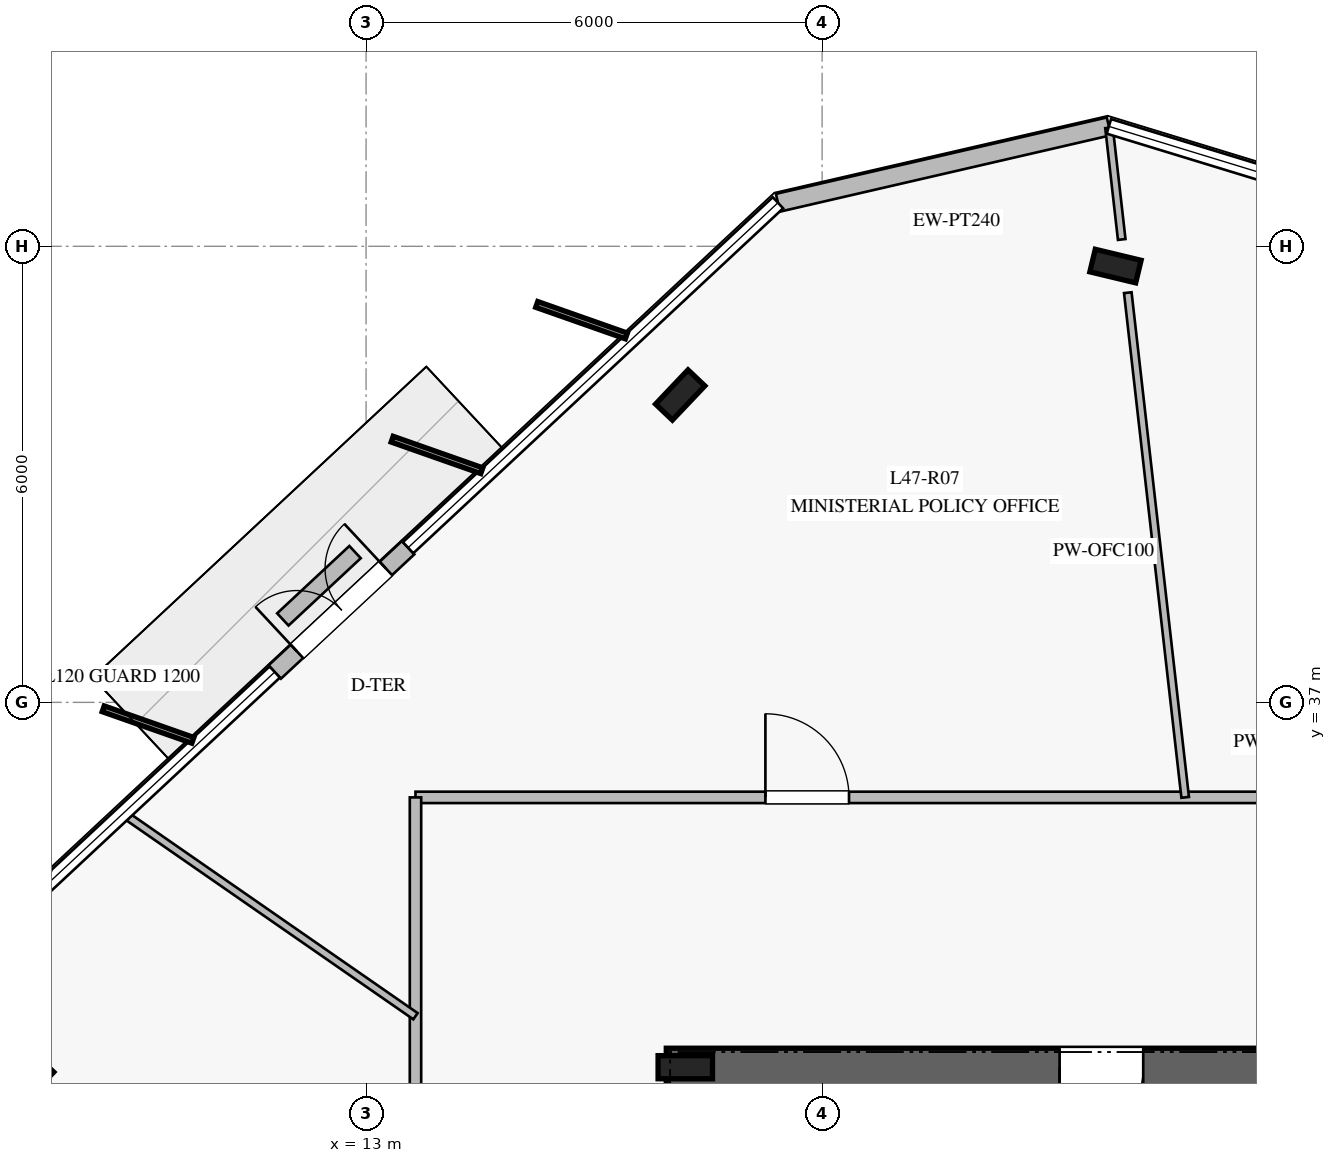
"""IFC4 building model, lengths in metres.
Left out: names, types, materials, properties, quantities, classifications, styles, units other than length and angle.
Written with IfcOpenShell. Run it as: python <this file> out.ifc"""

import sys

from ifc_helpers import new_model, si_unit, direction, frame, frame_2d, origin, origin_2d, place, context, subcontext, project, spatial, rectangle, i_section, extrude, element, fill, save


model = new_model("IFC4")
c1 = context("Model", 3, precision=1e-05, world=origin(), true_north=direction((0.0, 1.0)))
c2 = subcontext(c1, "Body", "Model", "MODEL_VIEW")
j1 = project(units=[si_unit("LENGTHUNIT", "METRE"), si_unit("PLANEANGLEUNIT", "RADIAN")], contexts=[c1])
p1 = place(None, origin())
s1 = spatial("IfcSite", under=j1, at=p1, CompositionType="ELEMENT")
p2 = place(p1, origin())
s2 = spatial("IfcBuilding", under=s1, at=p2, CompositionType="ELEMENT")
p3 = place(p2, frame((0.0, 0.0, 196.8)))
s3 = spatial("IfcBuildingStorey", under=s2, at=p3, CompositionType="ELEMENT", Elevation=196.8)
p4 = place(p3, frame((33.05, 32.2, 0.0), z_axis=(0.0, 0.0, 1.0), x_axis=(-1.0, 0.0, 0.0)))
e1 = element("IfcWall", 1, at=p4, inside=s3, PredefinedType="SHEAR", context=c2, shape_type="SweptSolid", body=[
    extrude(rectangle(XDim=16.1, YDim=0.5, at=frame_2d((8.05, 0.0))), origin(), (0.0, 0.0, 1.0), 3.78),
])
p5 = place(p4, frame((5.0, 0.0, 0.0)))
e2 = element("IfcOpeningElement", 2, at=p5, cuts=e1, PredefinedType="OPENING", context=c2, shape_type="SweptSolid", body=[
    extrude(rectangle(XDim=1.2, YDim=2.25, at=frame_2d((0.6, 1.125))), frame((0.0, 0.26, 0.0), z_axis=(0.0, -1.0, 0.0), x_axis=(1.0, 0.0, 0.0)), (0.0, 0.0, 1.0), 0.52),
])
p6 = place(p4, frame((9.825, 0.0, 0.0)))
e3 = element("IfcOpeningElement", 3, at=p6, cuts=e1, PredefinedType="OPENING", context=c2, shape_type="SweptSolid", body=[
    extrude(rectangle(XDim=1.1, YDim=2.2, at=frame_2d((0.55, 1.1))), frame((0.0, 0.26, 0.0), z_axis=(0.0, -1.0, 0.0), x_axis=(1.0, 0.0, 0.0)), (0.0, 0.0, 1.0), 0.52),
])
p7 = place(p3, frame((17.2, 32.2, 0.0), z_axis=(0.0, 0.0, 1.0), x_axis=(1.0, 0.0, 0.0)))
e4 = element("IfcColumn", 4, at=p7, inside=s3, PredefinedType="COLUMN", context=c2, shape_type="SweptSolid", body=[
    extrude(i_section(OverallWidth=0.304, OverallDepth=0.716, WebThickness=0.021, FlangeThickness=0.04, at=origin_2d()), origin(), (0.0, 0.0, 1.0), 4.0),
])
for number, where, z_axis, x_axis in (
    (5, (22.86, 42.74, 0.0), (0.0, 0.0, 1.0), (-0.972, 0.233, 0.0)),
    (6, (17.133, 41.044, 0.0), (0.0, 0.0, 1.0), (0.688, 0.725, 0.0)),
    (7, (8.567, 32.016, 0.0), (0.0, 0.0, 1.0), (0.688, 0.725, 0.0)),
):
    element("IfcColumn", number, at=place(p3, frame(where, z_axis=z_axis, x_axis=x_axis)), inside=s3, PredefinedType="COLUMN", context=c2, shape_type="SweptSolid", body=[
        extrude(i_section(OverallWidth=0.305, OverallDepth=0.62, WebThickness=0.021, FlangeThickness=0.04, at=origin_2d()), origin(), (0.0, 0.0, 1.0), 4.0),
    ])
p8 = place(p3, frame((22.773, 44.578, 0.0), z_axis=(0.0, 0.0, 1.0), x_axis=(-0.974385670371, -0.224883448427, 0.0)))
e8 = element("IfcWall", 8, at=p8, inside=s3, PredefinedType="STANDARD", context=c2, shape_type="SweptSolid", body=[
    extrude(rectangle(XDim=4.469, YDim=0.24, at=frame_2d((2.234, 0.0))), origin(), (0.0, 0.0, 1.0), 3.78),
])
p9 = place(p3, frame((13.553, 39.035, 0.0), z_axis=(0.0, 0.0, 1.0), x_axis=(-0.731451066601, -0.681893933958, 0.0)))
e9 = element("IfcWall", 9, at=p9, inside=s3, PredefinedType="STANDARD", context=c2, shape_type="SweptSolid", body=[
    extrude(rectangle(XDim=2.399, YDim=0.24, at=frame_2d((1.2, 0.0))), origin(), (0.0, 0.0, 1.0), 3.78),
])
p10 = place(p9, frame((0.4, 0.0, 0.0)))
e10 = element("IfcOpeningElement", 10, at=p10, cuts=e9, PredefinedType="OPENING", context=c2, shape_type="SweptSolid", body=[
    extrude(rectangle(XDim=1.6, YDim=2.25, at=frame_2d((0.8, 1.125))), frame((0.0, 0.13, 0.0), z_axis=(0.0, -1.0, 0.0), x_axis=(1.0, 0.0, 0.0)), (0.0, 0.0, 1.0), 0.26),
])
p11 = place(p3, frame((12.855, 38.977, 0.0), z_axis=(0.0, 0.0, 1.0), x_axis=(-0.731298971401, -0.682057046315, 0.0)))
e11 = element("IfcWall", 11, at=p11, inside=s3, PredefinedType="USERDEFINED", context=c2, shape_type="SweptSolid", body=[
    extrude(rectangle(XDim=1.299, YDim=0.22, at=frame_2d((0.649, 0.0))), origin(), (0.0, 0.0, 1.0), 0.4),
])
p12 = place(p3, frame((13.65, 35.75, 0.0), z_axis=(0.0, 0.0, 1.0), x_axis=(1.0, 0.0, 0.0)))
e12 = element("IfcWall", 12, at=p12, inside=s3, PredefinedType="PARTITIONING", context=c2, shape_type="SweptSolid", body=[
    extrude(rectangle(XDim=22.7, YDim=0.15, at=frame_2d((11.35, 0.0))), origin(), (0.0, 0.0, 1.0), 3.02),
])
p13 = place(p12, frame((14.901, 0.0, 0.0)))
e13 = element("IfcOpeningElement", 13, at=p13, cuts=e12, PredefinedType="OPENING", context=c2, shape_type="SweptSolid", body=[
    extrude(rectangle(XDim=1.1, YDim=2.2, at=frame_2d((0.55, 1.1))), frame((0.0, 0.085, 0.0), z_axis=(0.0, -1.0, 0.0), x_axis=(1.0, 0.0, 0.0)), (0.0, 0.0, 1.0), 0.17),
])
p14 = place(p12, frame((4.604, 0.0, 0.0)))
e14 = element("IfcOpeningElement", 14, at=p14, cuts=e12, PredefinedType="OPENING", context=c2, shape_type="SweptSolid", body=[
    extrude(rectangle(XDim=1.1, YDim=2.2, at=frame_2d((0.55, 1.1))), frame((0.0, 0.085, 0.0), z_axis=(0.0, -1.0, 0.0), x_axis=(1.0, 0.0, 0.0)), (0.0, 0.0, 1.0), 0.17),
])
p15 = place(p3, frame((13.65, 14.25, 0.0), z_axis=(0.0, 0.0, 1.0), x_axis=(0.0, 1.0, 0.0)))
e15 = element("IfcWall", 15, at=p15, inside=s3, PredefinedType="PARTITIONING", context=c2, shape_type="SweptSolid", body=[
    extrude(rectangle(XDim=21.5, YDim=0.15, at=frame_2d((10.75, 0.0))), origin(), (0.0, 0.0, 1.0), 3.05),
])
p16 = place(p15, frame((11.853, 0.0, 0.0)))
e16 = element("IfcOpeningElement", 16, at=p16, cuts=e15, PredefinedType="OPENING", context=c2, shape_type="SweptSolid", body=[
    extrude(rectangle(XDim=1.1, YDim=2.2, at=frame_2d((0.55, 1.1))), frame((0.0, 0.085, 0.0), z_axis=(0.0, -1.0, 0.0), x_axis=(1.0, 0.0, 0.0)), (0.0, 0.0, 1.0), 0.17),
])
p17 = place(p3, frame((23.777, 35.75, 0.0), z_axis=(0.0, 0.0, 1.0), x_axis=(-0.112997397255, 0.993595283913, 0.0)))
e17 = element("IfcWall", 17, at=p17, inside=s3, PredefinedType="MOVABLE", context=c2, shape_type="SweptSolid", body=[
    extrude(rectangle(XDim=6.683, YDim=0.1, at=frame_2d((3.341, 0.0))), origin(), (0.0, 0.0, 1.0), 3.02),
])
p18 = place(p3, frame((22.942, 43.09, 0.0), z_axis=(0.0, 0.0, 1.0), x_axis=(-0.112876363415, 0.993609041113, 0.0)))
e18 = element("IfcWall", 18, at=p18, inside=s3, PredefinedType="MOVABLE", context=c2, shape_type="SweptSolid", body=[
    extrude(rectangle(XDim=1.479, YDim=0.1, at=frame_2d((0.74, 0.0))), origin(), (0.0, 0.0, 1.0), 3.78),
])
p19 = place(p3, frame((13.65, 32.871, 0.0), z_axis=(0.0, 0.0, 1.0), x_axis=(-0.821756681919, 0.569838534781, 0.0)))
e19 = element("IfcWall", 19, at=p19, inside=s3, PredefinedType="MOVABLE", context=c2, shape_type="SweptSolid", body=[
    extrude(rectangle(XDim=4.664, YDim=0.1, at=frame_2d((2.332, 0.0))), origin(), (0.0, 0.0, 1.0), 3.05),
])
p20 = place(p10, frame((1.6, 0.0, 0.0), z_axis=(0.0, 0.0, 1.0), x_axis=(-1.0, 0.0, 0.0)))
e20 = element("IfcDoor", 20, at=p20, inside=s3, OperationType="DOUBLE_DOOR_SINGLE_SWING", PredefinedType="DOOR", context=c2, shape_type="SweptSolid", body=[
    extrude(rectangle(XDim=1.6, YDim=2.25, at=frame_2d((0.8, 1.125))), frame((0.0, 0.025, 0.0), z_axis=(0.0, -1.0, 0.0), x_axis=(1.0, 0.0, 0.0)), (0.0, 0.0, 1.0), 0.05),
])
fill(e10, e20)
p21 = place(p6, origin())
e21 = element("IfcDoor", 21, at=p21, inside=s3, OperationType="SINGLE_SWING_RIGHT", PredefinedType="DOOR", context=c2, shape_type="SweptSolid", body=[
    extrude(rectangle(XDim=1.1, YDim=2.2, at=frame_2d((0.55, 1.1))), frame((0.0, 0.025, 0.0), z_axis=(0.0, -1.0, 0.0), x_axis=(1.0, 0.0, 0.0)), (0.0, 0.0, 1.0), 0.05),
])
fill(e3, e21)
p22 = place(p14, origin())
e22 = element("IfcDoor", 22, at=p22, inside=s3, OperationType="SINGLE_SWING_LEFT", PredefinedType="DOOR", context=c2, shape_type="SweptSolid", body=[
    extrude(rectangle(XDim=1.1, YDim=2.2, at=frame_2d((0.55, 1.1))), frame((0.0, 0.025, 0.0), z_axis=(0.0, -1.0, 0.0), x_axis=(1.0, 0.0, 0.0)), (0.0, 0.0, 1.0), 0.05),
])
fill(e14, e22)
save(model, sys.argv[1])
